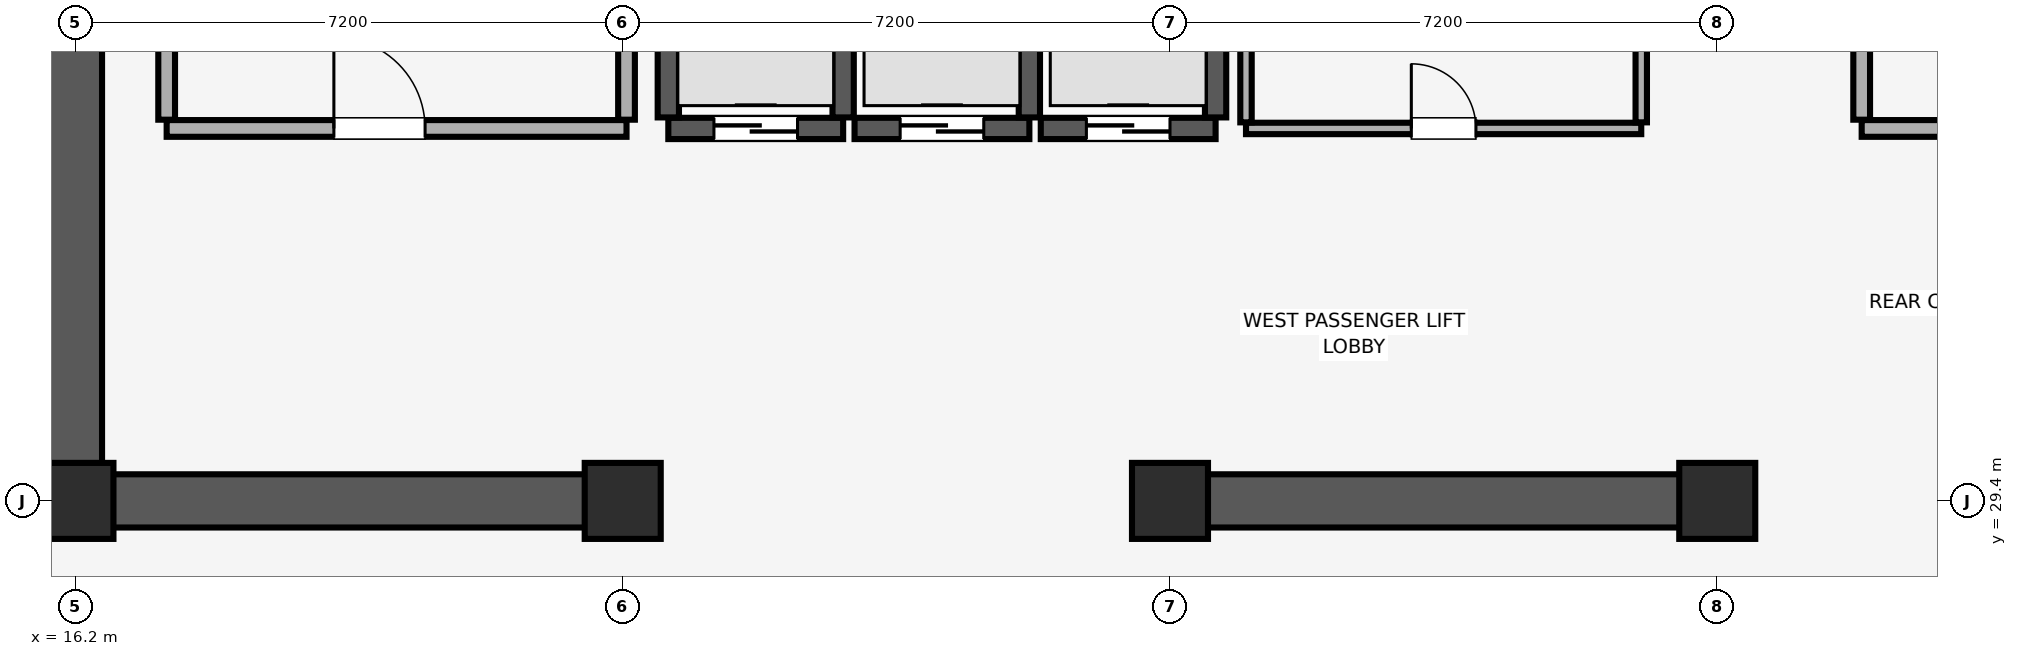
"""IFC4 building model, lengths in metres.
Left out: names, types, materials, properties, quantities, classifications, styles, units other than length and angle.
Written with IfcOpenShell. Run it as: python <this file> out.ifc"""

import sys

from ifc_helpers import new_model, si_unit, direction, frame, frame_2d, origin, origin_2d, place, context, subcontext, project, spatial, rectangle, extrude, element, fill, save


model = new_model("IFC4")
c1 = context("Model", 3, precision=1e-05, world=origin(), true_north=direction((0.0, 1.0)))
c2 = subcontext(c1, "Body", "Model", "MODEL_VIEW")
j1 = project(units=[si_unit("LENGTHUNIT", "METRE"), si_unit("PLANEANGLEUNIT", "RADIAN")], contexts=[c1])
p1 = place(None, origin())
s1 = spatial("IfcSite", under=j1, at=p1, CompositionType="ELEMENT")
p2 = place(p1, origin())
s2 = spatial("IfcBuilding", under=s1, at=p2, CompositionType="ELEMENT")
p3 = place(p2, frame((0.0, 0.0, 280.5)))
s3 = spatial("IfcBuildingStorey", under=s2, at=p3, CompositionType="ELEMENT", Elevation=280.5)
for number, where, z_axis, x_axis in (
    (1, (16.2, 29.4, 0.0), (0.0, 0.0, 1.0), (1.0, 0.0, 0.0)),
    (2, (23.4, 29.4, 0.0), (0.0, 0.0, 1.0), (1.0, 0.0, 0.0)),
    (3, (30.6, 29.4, 0.0), (0.0, 0.0, 1.0), (1.0, 0.0, 0.0)),
    (4, (37.8, 29.4, 0.0), (0.0, 0.0, 1.0), (1.0, 0.0, 0.0)),
):
    element("IfcColumn", number, at=place(p3, frame(where, z_axis=z_axis, x_axis=x_axis)), inside=s3, PredefinedType="COLUMN", context=c2, shape_type="SweptSolid", body=[
        extrude(rectangle(XDim=1.0, YDim=1.0, at=origin_2d()), origin(), (0.0, 0.0, 1.0), 5.1),
    ])
p4 = place(p3, frame((16.2, 29.4, 0.0), z_axis=(0.0, 0.0, 1.0), x_axis=(0.0, 1.0, 0.0)))
e5 = element("IfcWall", 5, at=p4, inside=s3, PredefinedType="SHEAR", context=c2, shape_type="SweptSolid", body=[
    extrude(rectangle(XDim=19.2, YDim=0.7, at=frame_2d((9.6, 0.0))), origin(), (0.0, 0.0, 1.0), 5.1),
])
p5 = place(p3, frame((16.555, 29.4, 0.0), z_axis=(0.0, 0.0, 1.0), x_axis=(1.0, 0.0, 0.0)))
e6 = element("IfcWall", 6, at=p5, inside=s3, PredefinedType="SHEAR", context=c2, shape_type="SweptSolid", body=[
    extrude(rectangle(XDim=7.045, YDim=0.7, at=frame_2d((3.522, 0.0))), origin(), (0.0, 0.0, 1.0), 5.1),
])
p6 = place(p3, frame((30.4, 29.4, 0.0), z_axis=(0.0, 0.0, 1.0), x_axis=(1.0, 0.0, 0.0)))
e7 = element("IfcWall", 7, at=p6, inside=s3, PredefinedType="SHEAR", context=c2, shape_type="SweptSolid", body=[
    extrude(rectangle(XDim=7.6, YDim=0.7, at=frame_2d((3.8, 0.0))), origin(), (0.0, 0.0, 1.0), 5.1),
])
p7 = place(p3, frame((24.0, 34.3, 0.0), z_axis=(0.0, 0.0, 1.0), x_axis=(1.0, 0.0, 0.0)))
e8 = element("IfcWall", 8, at=p7, inside=s3, PredefinedType="SHEAR", context=c2, shape_type="SweptSolid", body=[
    extrude(rectangle(XDim=2.3, YDim=0.28, at=frame_2d((1.15, 0.0))), origin(), (0.0, 0.0, 1.0), 5.1),
])
p8 = place(p7, frame((0.6, 0.0, 0.0)))
e9 = element("IfcOpeningElement", 9, at=p8, cuts=e8, PredefinedType="OPENING", context=c2, shape_type="SweptSolid", body=[
    extrude(rectangle(XDim=1.1, YDim=2.2, at=frame_2d((0.55, 1.1))), frame((0.0, 0.15, 0.0), z_axis=(0.0, -1.0, 0.0), x_axis=(1.0, 0.0, 0.0)), (0.0, 0.0, 1.0), 0.3),
])
for number, where, z_axis, x_axis in (
    (10, (24.0, 34.445, 0.0), (0.0, 0.0, 1.0), (0.0, 1.0, 0.0)),
    (11, (26.3, 34.445, 0.0), (0.0, 0.0, 1.0), (0.0, 1.0, 0.0)),
):
    element("IfcWall", number, at=place(p3, frame(where, z_axis=z_axis, x_axis=x_axis)), inside=s3, PredefinedType="SHEAR", context=c2, shape_type="SweptSolid", body=[
        extrude(rectangle(XDim=2.01, YDim=0.28, at=frame_2d((1.005, 0.0))), origin(), (0.0, 0.0, 1.0), 5.1),
    ])
p9 = place(p3, frame((26.45, 34.3, 0.0), z_axis=(0.0, 0.0, 1.0), x_axis=(1.0, 0.0, 0.0)))
e12 = element("IfcWall", 12, at=p9, inside=s3, PredefinedType="SHEAR", context=c2, shape_type="SweptSolid", body=[
    extrude(rectangle(XDim=2.3, YDim=0.28, at=frame_2d((1.15, 0.0))), origin(), (0.0, 0.0, 1.0), 5.1),
])
p10 = place(p9, frame((0.6, 0.0, 0.0)))
e13 = element("IfcOpeningElement", 13, at=p10, cuts=e12, PredefinedType="OPENING", context=c2, shape_type="SweptSolid", body=[
    extrude(rectangle(XDim=1.1, YDim=2.2, at=frame_2d((0.55, 1.1))), frame((0.0, 0.15, 0.0), z_axis=(0.0, -1.0, 0.0), x_axis=(1.0, 0.0, 0.0)), (0.0, 0.0, 1.0), 0.3),
])
p11 = place(p3, frame((28.75, 34.445, 0.0), z_axis=(0.0, 0.0, 1.0), x_axis=(0.0, 1.0, 0.0)))
e14 = element("IfcWall", 14, at=p11, inside=s3, PredefinedType="SHEAR", context=c2, shape_type="SweptSolid", body=[
    extrude(rectangle(XDim=2.01, YDim=0.28, at=frame_2d((1.005, 0.0))), origin(), (0.0, 0.0, 1.0), 5.1),
])
p12 = place(p3, frame((28.9, 34.3, 0.0), z_axis=(0.0, 0.0, 1.0), x_axis=(1.0, 0.0, 0.0)))
e15 = element("IfcWall", 15, at=p12, inside=s3, PredefinedType="SHEAR", context=c2, shape_type="SweptSolid", body=[
    extrude(rectangle(XDim=2.3, YDim=0.28, at=frame_2d((1.15, 0.0))), origin(), (0.0, 0.0, 1.0), 5.1),
])
p13 = place(p12, frame((0.6, 0.0, 0.0)))
e16 = element("IfcOpeningElement", 16, at=p13, cuts=e15, PredefinedType="OPENING", context=c2, shape_type="SweptSolid", body=[
    extrude(rectangle(XDim=1.1, YDim=2.2, at=frame_2d((0.55, 1.1))), frame((0.0, 0.15, 0.0), z_axis=(0.0, -1.0, 0.0), x_axis=(1.0, 0.0, 0.0)), (0.0, 0.0, 1.0), 0.3),
])
p14 = place(p3, frame((31.2, 34.445, 0.0), z_axis=(0.0, 0.0, 1.0), x_axis=(0.0, 1.0, 0.0)))
e17 = element("IfcWall", 17, at=p14, inside=s3, PredefinedType="SHEAR", context=c2, shape_type="SweptSolid", body=[
    extrude(rectangle(XDim=2.01, YDim=0.28, at=frame_2d((1.005, 0.0))), origin(), (0.0, 0.0, 1.0), 5.1),
])
p15 = place(p3, frame((17.4, 34.3, 0.0), z_axis=(0.0, 0.0, 1.0), x_axis=(1.0, 0.0, 0.0)))
e18 = element("IfcWall", 18, at=p15, inside=s3, PredefinedType="PARTITIONING", context=c2, shape_type="SweptSolid", body=[
    extrude(rectangle(XDim=6.05, YDim=0.22, at=frame_2d((3.025, 0.0))), origin(), (0.0, 0.0, 1.0), 5.1),
])
p16 = place(p15, frame((2.2, 0.0, 0.0)))
e19 = element("IfcOpeningElement", 19, at=p16, cuts=e18, PredefinedType="OPENING", context=c2, shape_type="SweptSolid", body=[
    extrude(rectangle(XDim=1.2, YDim=2.15, at=frame_2d((0.6, 1.075))), frame((0.0, 0.12, 0.0), z_axis=(0.0, -1.0, 0.0), x_axis=(1.0, 0.0, 0.0)), (0.0, 0.0, 1.0), 0.24),
])
p17 = place(p3, frame((17.4, 34.415, 0.0), z_axis=(0.0, 0.0, 1.0), x_axis=(0.0, 1.0, 0.0)))
e20 = element("IfcWall", 20, at=p17, inside=s3, PredefinedType="PARTITIONING", context=c2, shape_type="SweptSolid", body=[
    extrude(rectangle(XDim=5.43, YDim=0.22, at=frame_2d((2.715, 0.0))), origin(), (0.0, 0.0, 1.0), 5.1),
])
p18 = place(p3, frame((23.45, 34.415, 0.0), z_axis=(0.0, 0.0, 1.0), x_axis=(0.0, 1.0, 0.0)))
e21 = element("IfcWall", 21, at=p18, inside=s3, PredefinedType="PARTITIONING", context=c2, shape_type="SweptSolid", body=[
    extrude(rectangle(XDim=5.64, YDim=0.22, at=frame_2d((2.82, 0.0))), origin(), (0.0, 0.0, 1.0), 5.1),
])
p19 = place(p3, frame((39.7, 34.3, 0.0), z_axis=(0.0, 0.0, 1.0), x_axis=(1.0, 0.0, 0.0)))
e22 = element("IfcWall", 22, at=p19, inside=s3, PredefinedType="PARTITIONING", context=c2, shape_type="SweptSolid", body=[
    extrude(rectangle(XDim=4.6, YDim=0.22, at=frame_2d((2.3, 0.0))), origin(), (0.0, 0.0, 1.0), 5.1),
])
p20 = place(p19, frame((1.7, 0.0, 0.0)))
e23 = element("IfcOpeningElement", 23, at=p20, cuts=e22, PredefinedType="OPENING", context=c2, shape_type="SweptSolid", body=[
    extrude(rectangle(XDim=1.2, YDim=2.15, at=frame_2d((0.6, 1.075))), frame((0.0, 0.12, 0.0), z_axis=(0.0, -1.0, 0.0), x_axis=(1.0, 0.0, 0.0)), (0.0, 0.0, 1.0), 0.24),
])
p21 = place(p3, frame((39.7, 34.415, 0.0), z_axis=(0.0, 0.0, 1.0), x_axis=(0.0, 1.0, 0.0)))
e24 = element("IfcWall", 24, at=p21, inside=s3, PredefinedType="PARTITIONING", context=c2, shape_type="SweptSolid", body=[
    extrude(rectangle(XDim=5.785, YDim=0.22, at=frame_2d((2.893, 0.0))), origin(), (0.0, 0.0, 1.0), 5.1),
])
p22 = place(p3, frame((31.6, 34.3, 0.0), z_axis=(0.0, 0.0, 1.0), x_axis=(1.0, 0.0, 0.0)))
e25 = element("IfcWall", 25, at=p22, inside=s3, PredefinedType="PARTITIONING", context=c2, shape_type="SweptSolid", body=[
    extrude(rectangle(XDim=5.2, YDim=0.15, at=frame_2d((2.6, 0.0))), origin(), (0.0, 0.0, 1.0), 5.1),
])
p23 = place(p22, frame((2.175, 0.0, 0.0)))
e26 = element("IfcOpeningElement", 26, at=p23, cuts=e25, PredefinedType="OPENING", context=c2, shape_type="SweptSolid", body=[
    extrude(rectangle(XDim=0.85, YDim=2.1, at=frame_2d((0.425, 1.05))), frame((0.0, 0.085, 0.0), z_axis=(0.0, -1.0, 0.0), x_axis=(1.0, 0.0, 0.0)), (0.0, 0.0, 1.0), 0.17),
])
for number, where, z_axis, x_axis in (
    (27, (31.6, 34.38, 0.0), (0.0, 0.0, 1.0), (0.0, 1.0, 0.0)),
    (28, (36.8, 34.38, 0.0), (0.0, 0.0, 1.0), (0.0, 1.0, 0.0)),
):
    element("IfcWall", number, at=place(p3, frame(where, z_axis=z_axis, x_axis=x_axis)), inside=s3, PredefinedType="PARTITIONING", context=c2, shape_type="SweptSolid", body=[
        extrude(rectangle(XDim=4.94, YDim=0.15, at=frame_2d((2.47, 0.0))), origin(), (0.0, 0.0, 1.0), 5.1),
    ])
p24 = place(p8, origin())
e29 = element("IfcDoor", 29, at=p24, inside=s3, OperationType="DOUBLE_DOOR_SLIDING", PredefinedType="DOOR", context=c2, shape_type="SweptSolid", body=[
    extrude(rectangle(XDim=1.1, YDim=2.2, at=frame_2d((0.55, 1.1))), frame((0.0, 0.025, 0.0), z_axis=(0.0, -1.0, 0.0), x_axis=(1.0, 0.0, 0.0)), (0.0, 0.0, 1.0), 0.05),
])
fill(e9, e29)
p25 = place(p10, origin())
e30 = element("IfcDoor", 30, at=p25, inside=s3, OperationType="DOUBLE_DOOR_SLIDING", PredefinedType="DOOR", context=c2, shape_type="SweptSolid", body=[
    extrude(rectangle(XDim=1.1, YDim=2.2, at=frame_2d((0.55, 1.1))), frame((0.0, 0.025, 0.0), z_axis=(0.0, -1.0, 0.0), x_axis=(1.0, 0.0, 0.0)), (0.0, 0.0, 1.0), 0.05),
])
fill(e13, e30)
p26 = place(p13, origin())
e31 = element("IfcDoor", 31, at=p26, inside=s3, OperationType="DOUBLE_DOOR_SLIDING", PredefinedType="DOOR", context=c2, shape_type="SweptSolid", body=[
    extrude(rectangle(XDim=1.1, YDim=2.2, at=frame_2d((0.55, 1.1))), frame((0.0, 0.025, 0.0), z_axis=(0.0, -1.0, 0.0), x_axis=(1.0, 0.0, 0.0)), (0.0, 0.0, 1.0), 0.05),
])
fill(e16, e31)
p27 = place(p16, origin())
e32 = element("IfcDoor", 32, at=p27, inside=s3, OperationType="SINGLE_SWING_LEFT", PredefinedType="DOOR", context=c2, shape_type="SweptSolid", body=[
    extrude(rectangle(XDim=1.2, YDim=2.15, at=frame_2d((0.6, 1.075))), frame((0.0, 0.025, 0.0), z_axis=(0.0, -1.0, 0.0), x_axis=(1.0, 0.0, 0.0)), (0.0, 0.0, 1.0), 0.05),
])
fill(e19, e32)
p28 = place(p23, origin())
e33 = element("IfcDoor", 33, at=p28, inside=s3, OperationType="SINGLE_SWING_LEFT", PredefinedType="DOOR", context=c2, shape_type="SweptSolid", body=[
    extrude(rectangle(XDim=0.85, YDim=2.1, at=frame_2d((0.425, 1.05))), frame((0.0, 0.025, 0.0), z_axis=(0.0, -1.0, 0.0), x_axis=(1.0, 0.0, 0.0)), (0.0, 0.0, 1.0), 0.05),
])
fill(e26, e33)
save(model, sys.argv[1])
